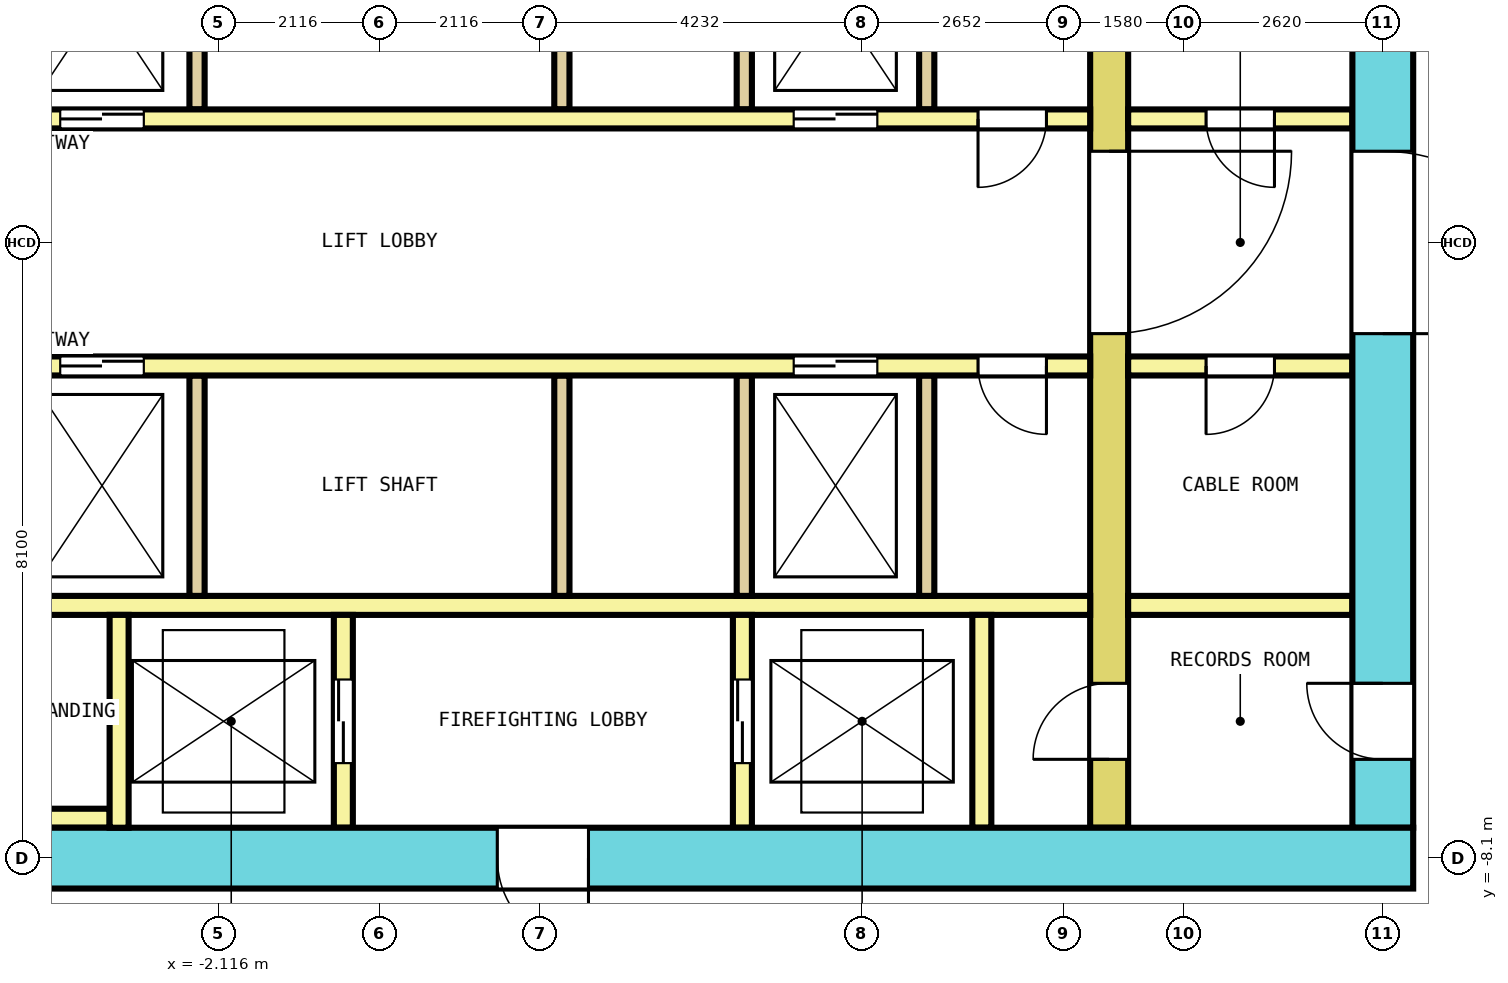
"""IFC4 building model, lengths in metres.
Left out: names, types, materials, properties, quantities, classifications, styles, units other than length and angle.
Written with IfcOpenShell. Run it as: python <this file> out.ifc"""

import sys

from ifc_helpers import new_model, si_unit, direction, frame, frame_2d, origin, place, context, subcontext, project, spatial, rectangle, extrude, element, fill, save


model = new_model("IFC4")
c1 = context("Model", 3, precision=1e-05, world=origin(), true_north=direction((0.0, 1.0)))
c2 = subcontext(c1, "Body", "Model", "MODEL_VIEW")
j1 = project(units=[si_unit("LENGTHUNIT", "METRE"), si_unit("PLANEANGLEUNIT", "RADIAN")], contexts=[c1])
p1 = place(None, origin())
s1 = spatial("IfcSite", under=j1, at=p1, CompositionType="ELEMENT")
p2 = place(p1, origin())
s2 = spatial("IfcBuilding", under=s1, at=p2, CompositionType="ELEMENT")
p3 = place(p2, frame((0.0, 0.0, 126.4)))
s3 = spatial("IfcBuildingStorey", under=s2, at=p3, CompositionType="ELEMENT", Elevation=126.4)
p4 = place(p3, frame((-13.6, -8.1, 0.0), z_axis=(0.0, 0.0, 1.0), x_axis=(1.0, 0.0, 0.0)))
e1 = element("IfcWall", 1, at=p4, inside=s3, PredefinedType="SHEAR", context=c2, shape_type="SweptSolid", body=[
    extrude(rectangle(XDim=27.2, YDim=0.8, at=frame_2d((13.6, 0.0))), origin(), (0.0, 0.0, 1.0), 4.1),
])
p5 = place(p4, frame((15.15, 0.0, 0.0)))
e2 = element("IfcOpeningElement", 2, at=p5, cuts=e1, PredefinedType="OPENING", context=c2, shape_type="SweptSolid", body=[
    extrude(rectangle(XDim=1.2, YDim=2.1, at=frame_2d((0.6, 1.05))), frame((0.0, 0.41, 0.0), z_axis=(0.0, -1.0, 0.0), x_axis=(1.0, 0.0, 0.0)), (0.0, 0.0, 1.0), 0.82),
])
p6 = place(p3, frame((13.2, -7.7, 0.0), z_axis=(0.0, 0.0, 1.0), x_axis=(0.0, 1.0, 0.0)))
e3 = element("IfcWall", 3, at=p6, inside=s3, PredefinedType="SHEAR", context=c2, shape_type="SweptSolid", body=[
    extrude(rectangle(XDim=15.4, YDim=0.8, at=frame_2d((7.7, 0.0))), origin(), (0.0, 0.0, 1.0), 4.1),
])
p7 = place(p6, frame((6.5, 0.0, 0.0)))
e4 = element("IfcOpeningElement", 4, at=p7, cuts=e3, PredefinedType="OPENING", context=c2, shape_type="SweptSolid", body=[
    extrude(rectangle(XDim=2.4, YDim=2.1, at=frame_2d((1.2, 1.05))), frame((0.0, 0.41, 0.0), z_axis=(0.0, -1.0, 0.0), x_axis=(1.0, 0.0, 0.0)), (0.0, 0.0, 1.0), 0.82),
])
p8 = place(p6, frame((13.4, 0.0, 0.0)))
e5 = element("IfcOpeningElement", 5, at=p8, cuts=e3, PredefinedType="OPENING", context=c2, shape_type="SweptSolid", body=[
    extrude(rectangle(XDim=1.2, YDim=2.1, at=frame_2d((0.6, 1.05))), frame((0.0, 0.41, 0.0), z_axis=(0.0, -1.0, 0.0), x_axis=(1.0, 0.0, 0.0)), (0.0, 0.0, 1.0), 0.82),
])
p9 = place(p6, frame((0.9, 0.0, 0.0)))
e6 = element("IfcOpeningElement", 6, at=p9, cuts=e3, PredefinedType="OPENING", context=c2, shape_type="SweptSolid", body=[
    extrude(rectangle(XDim=1.0, YDim=2.1, at=frame_2d((0.5, 1.05))), frame((0.0, 0.41, 0.0), z_axis=(0.0, -1.0, 0.0), x_axis=(1.0, 0.0, 0.0)), (0.0, 0.0, 1.0), 0.82),
])
p10 = place(p3, frame((9.6, -7.7, 0.0), z_axis=(0.0, 0.0, 1.0), x_axis=(0.0, 1.0, 0.0)))
e7 = element("IfcWall", 7, at=p10, inside=s3, PredefinedType="SHEAR", context=c2, shape_type="SweptSolid", body=[
    extrude(rectangle(XDim=15.4, YDim=0.5, at=frame_2d((7.7, 0.0))), origin(), (0.0, 0.0, 1.0), 4.1),
])
p11 = place(p10, frame((6.5, 0.0, 0.0)))
e8 = element("IfcOpeningElement", 8, at=p11, cuts=e7, PredefinedType="OPENING", context=c2, shape_type="SweptSolid", body=[
    extrude(rectangle(XDim=2.4, YDim=2.1, at=frame_2d((1.2, 1.05))), frame((0.0, 0.26, 0.0), z_axis=(0.0, -1.0, 0.0), x_axis=(1.0, 0.0, 0.0)), (0.0, 0.0, 1.0), 0.52),
])
p12 = place(p10, frame((13.4, 0.0, 0.0)))
e9 = element("IfcOpeningElement", 9, at=p12, cuts=e7, PredefinedType="OPENING", context=c2, shape_type="SweptSolid", body=[
    extrude(rectangle(XDim=1.2, YDim=2.1, at=frame_2d((0.6, 1.05))), frame((0.0, 0.26, 0.0), z_axis=(0.0, -1.0, 0.0), x_axis=(1.0, 0.0, 0.0)), (0.0, 0.0, 1.0), 0.52),
])
p13 = place(p10, frame((0.9, 0.0, 0.0)))
e10 = element("IfcOpeningElement", 10, at=p13, cuts=e7, PredefinedType="OPENING", context=c2, shape_type="SweptSolid", body=[
    extrude(rectangle(XDim=1.0, YDim=2.1, at=frame_2d((0.5, 1.05))), frame((0.0, 0.26, 0.0), z_axis=(0.0, -1.0, 0.0), x_axis=(1.0, 0.0, 0.0)), (0.0, 0.0, 1.0), 0.52),
])
p14 = place(p3, frame((-9.35, 1.625, 0.0), z_axis=(0.0, 0.0, 1.0), x_axis=(1.0, 0.0, 0.0)))
e11 = element("IfcWall", 11, at=p14, inside=s3, PredefinedType="SOLIDWALL", context=c2, shape_type="SweptSolid", body=[
    extrude(rectangle(XDim=18.7, YDim=0.25, at=frame_2d((9.35, 0.0))), origin(), (0.0, 0.0, 1.0), 4.1),
])
p15 = place(p14, frame((2.85, 0.0, 0.0)))
e12 = element("IfcOpeningElement", 12, at=p15, cuts=e11, PredefinedType="OPENING", context=c2, shape_type="SweptSolid", body=[
    extrude(rectangle(XDim=1.1, YDim=2.1, at=frame_2d((0.55, 1.05))), frame((0.0, 0.135, 0.0), z_axis=(0.0, -1.0, 0.0), x_axis=(1.0, 0.0, 0.0)), (0.0, 0.0, 1.0), 0.27),
])
p16 = place(p14, frame((5.15, 0.0, 0.0)))
e13 = element("IfcOpeningElement", 13, at=p16, cuts=e11, PredefinedType="OPENING", context=c2, shape_type="SweptSolid", body=[
    extrude(rectangle(XDim=1.1, YDim=2.1, at=frame_2d((0.55, 1.05))), frame((0.0, 0.135, 0.0), z_axis=(0.0, -1.0, 0.0), x_axis=(1.0, 0.0, 0.0)), (0.0, 0.0, 1.0), 0.27),
])
p17 = place(p14, frame((14.8, 0.0, 0.0)))
e14 = element("IfcOpeningElement", 14, at=p17, cuts=e11, PredefinedType="OPENING", context=c2, shape_type="SweptSolid", body=[
    extrude(rectangle(XDim=1.1, YDim=2.1, at=frame_2d((0.55, 1.05))), frame((0.0, 0.135, 0.0), z_axis=(0.0, -1.0, 0.0), x_axis=(1.0, 0.0, 0.0)), (0.0, 0.0, 1.0), 0.27),
])
p18 = place(p14, frame((0.575, 0.0, 0.0)))
e15 = element("IfcOpeningElement", 15, at=p18, cuts=e11, PredefinedType="OPENING", context=c2, shape_type="SweptSolid", body=[
    extrude(rectangle(XDim=0.9, YDim=2.1, at=frame_2d((0.45, 1.05))), frame((0.0, 0.135, 0.0), z_axis=(0.0, -1.0, 0.0), x_axis=(1.0, 0.0, 0.0)), (0.0, 0.0, 1.0), 0.27),
])
p19 = place(p14, frame((17.225, 0.0, 0.0)))
e16 = element("IfcOpeningElement", 16, at=p19, cuts=e11, PredefinedType="OPENING", context=c2, shape_type="SweptSolid", body=[
    extrude(rectangle(XDim=0.9, YDim=2.1, at=frame_2d((0.45, 1.05))), frame((0.0, 0.135, 0.0), z_axis=(0.0, -1.0, 0.0), x_axis=(1.0, 0.0, 0.0)), (0.0, 0.0, 1.0), 0.27),
])
p20 = place(p3, frame((9.85, 1.625, 0.0), z_axis=(0.0, 0.0, 1.0), x_axis=(1.0, 0.0, 0.0)))
e17 = element("IfcWall", 17, at=p20, inside=s3, PredefinedType="SOLIDWALL", context=c2, shape_type="SweptSolid", body=[
    extrude(rectangle(XDim=2.95, YDim=0.25, at=frame_2d((1.475, 0.0))), origin(), (0.0, 0.0, 1.0), 4.1),
])
p21 = place(p20, frame((1.025, 0.0, 0.0)))
e18 = element("IfcOpeningElement", 18, at=p21, cuts=e17, PredefinedType="OPENING", context=c2, shape_type="SweptSolid", body=[
    extrude(rectangle(XDim=0.9, YDim=2.1, at=frame_2d((0.45, 1.05))), frame((0.0, 0.135, 0.0), z_axis=(0.0, -1.0, 0.0), x_axis=(1.0, 0.0, 0.0)), (0.0, 0.0, 1.0), 0.27),
])
for number, where, z_axis, x_axis in (
    (19, (-2.4, 1.75, 0.0), (0.0, 0.0, 1.0), (0.0, 1.0, 0.0)),
    (20, (2.4, 1.75, 0.0), (0.0, 0.0, 1.0), (0.0, 1.0, 0.0)),
    (21, (4.8, 1.75, 0.0), (0.0, 0.0, 1.0), (0.0, 1.0, 0.0)),
    (22, (7.2, 1.75, 0.0), (0.0, 0.0, 1.0), (0.0, 1.0, 0.0)),
):
    element("IfcWall", number, at=place(p3, frame(where, z_axis=z_axis, x_axis=x_axis)), inside=s3, PredefinedType="SOLIDWALL", context=c2, shape_type="SweptSolid", body=[
        extrude(rectangle(XDim=2.9, YDim=0.2, at=frame_2d((1.45, 0.0))), origin(), (0.0, 0.0, 1.0), 4.1),
    ])
p22 = place(p3, frame((-9.35, -1.625, 0.0), z_axis=(0.0, 0.0, 1.0), x_axis=(1.0, 0.0, 0.0)))
e23 = element("IfcWall", 23, at=p22, inside=s3, PredefinedType="SOLIDWALL", context=c2, shape_type="SweptSolid", body=[
    extrude(rectangle(XDim=18.7, YDim=0.25, at=frame_2d((9.35, 0.0))), origin(), (0.0, 0.0, 1.0), 4.1),
])
p23 = place(p22, frame((2.85, 0.0, 0.0)))
e24 = element("IfcOpeningElement", 24, at=p23, cuts=e23, PredefinedType="OPENING", context=c2, shape_type="SweptSolid", body=[
    extrude(rectangle(XDim=1.1, YDim=2.1, at=frame_2d((0.55, 1.05))), frame((0.0, 0.135, 0.0), z_axis=(0.0, -1.0, 0.0), x_axis=(1.0, 0.0, 0.0)), (0.0, 0.0, 1.0), 0.27),
])
p24 = place(p22, frame((5.15, 0.0, 0.0)))
e25 = element("IfcOpeningElement", 25, at=p24, cuts=e23, PredefinedType="OPENING", context=c2, shape_type="SweptSolid", body=[
    extrude(rectangle(XDim=1.1, YDim=2.1, at=frame_2d((0.55, 1.05))), frame((0.0, 0.135, 0.0), z_axis=(0.0, -1.0, 0.0), x_axis=(1.0, 0.0, 0.0)), (0.0, 0.0, 1.0), 0.27),
])
p25 = place(p22, frame((14.8, 0.0, 0.0)))
e26 = element("IfcOpeningElement", 26, at=p25, cuts=e23, PredefinedType="OPENING", context=c2, shape_type="SweptSolid", body=[
    extrude(rectangle(XDim=1.1, YDim=2.1, at=frame_2d((0.55, 1.05))), frame((0.0, 0.135, 0.0), z_axis=(0.0, -1.0, 0.0), x_axis=(1.0, 0.0, 0.0)), (0.0, 0.0, 1.0), 0.27),
])
p26 = place(p22, frame((0.575, 0.0, 0.0)))
e27 = element("IfcOpeningElement", 27, at=p26, cuts=e23, PredefinedType="OPENING", context=c2, shape_type="SweptSolid", body=[
    extrude(rectangle(XDim=0.9, YDim=2.1, at=frame_2d((0.45, 1.05))), frame((0.0, 0.135, 0.0), z_axis=(0.0, -1.0, 0.0), x_axis=(1.0, 0.0, 0.0)), (0.0, 0.0, 1.0), 0.27),
])
p27 = place(p22, frame((17.225, 0.0, 0.0)))
e28 = element("IfcOpeningElement", 28, at=p27, cuts=e23, PredefinedType="OPENING", context=c2, shape_type="SweptSolid", body=[
    extrude(rectangle(XDim=0.9, YDim=2.1, at=frame_2d((0.45, 1.05))), frame((0.0, 0.135, 0.0), z_axis=(0.0, -1.0, 0.0), x_axis=(1.0, 0.0, 0.0)), (0.0, 0.0, 1.0), 0.27),
])
p28 = place(p3, frame((9.85, -1.625, 0.0), z_axis=(0.0, 0.0, 1.0), x_axis=(1.0, 0.0, 0.0)))
e29 = element("IfcWall", 29, at=p28, inside=s3, PredefinedType="SOLIDWALL", context=c2, shape_type="SweptSolid", body=[
    extrude(rectangle(XDim=2.95, YDim=0.25, at=frame_2d((1.475, 0.0))), origin(), (0.0, 0.0, 1.0), 4.1),
])
p29 = place(p28, frame((1.025, 0.0, 0.0)))
e30 = element("IfcOpeningElement", 30, at=p29, cuts=e29, PredefinedType="OPENING", context=c2, shape_type="SweptSolid", body=[
    extrude(rectangle(XDim=0.9, YDim=2.1, at=frame_2d((0.45, 1.05))), frame((0.0, 0.135, 0.0), z_axis=(0.0, -1.0, 0.0), x_axis=(1.0, 0.0, 0.0)), (0.0, 0.0, 1.0), 0.27),
])
p30 = place(p3, frame((-9.35, -4.775, 0.0), z_axis=(0.0, 0.0, 1.0), x_axis=(1.0, 0.0, 0.0)))
e31 = element("IfcWall", 31, at=p30, inside=s3, PredefinedType="SOLIDWALL", context=c2, shape_type="SweptSolid", body=[
    extrude(rectangle(XDim=18.7, YDim=0.25, at=frame_2d((9.35, 0.0))), origin(), (0.0, 0.0, 1.0), 4.1),
])
p31 = place(p3, frame((9.85, -4.775, 0.0), z_axis=(0.0, 0.0, 1.0), x_axis=(1.0, 0.0, 0.0)))
e32 = element("IfcWall", 32, at=p31, inside=s3, PredefinedType="SOLIDWALL", context=c2, shape_type="SweptSolid", body=[
    extrude(rectangle(XDim=2.95, YDim=0.25, at=frame_2d((1.475, 0.0))), origin(), (0.0, 0.0, 1.0), 4.1),
])
for number, where, z_axis, x_axis in (
    (33, (-2.4, -4.65, 0.0), (0.0, 0.0, 1.0), (0.0, 1.0, 0.0)),
    (34, (2.4, -4.65, 0.0), (0.0, 0.0, 1.0), (0.0, 1.0, 0.0)),
    (35, (4.8, -4.65, 0.0), (0.0, 0.0, 1.0), (0.0, 1.0, 0.0)),
    (36, (7.2, -4.65, 0.0), (0.0, 0.0, 1.0), (0.0, 1.0, 0.0)),
):
    element("IfcWall", number, at=place(p3, frame(where, z_axis=z_axis, x_axis=x_axis)), inside=s3, PredefinedType="SOLIDWALL", context=c2, shape_type="SweptSolid", body=[
        extrude(rectangle(XDim=2.9, YDim=0.2, at=frame_2d((1.45, 0.0))), origin(), (0.0, 0.0, 1.0), 4.1),
    ])
p32 = place(p3, frame((-9.35, -7.575, 0.0), z_axis=(0.0, 0.0, 1.0), x_axis=(1.0, 0.0, 0.0)))
e37 = element("IfcWall", 37, at=p32, inside=s3, PredefinedType="SOLIDWALL", context=c2, shape_type="SweptSolid", body=[
    extrude(rectangle(XDim=5.8, YDim=0.25, at=frame_2d((2.9, 0.0))), origin(), (0.0, 0.0, 1.0), 4.1),
])
p33 = place(p3, frame((-3.425, -7.7, 0.0), z_axis=(0.0, 0.0, 1.0), x_axis=(0.0, 1.0, 0.0)))
e38 = element("IfcWall", 38, at=p33, inside=s3, PredefinedType="SOLIDWALL", context=c2, shape_type="SweptSolid", body=[
    extrude(rectangle(XDim=2.8, YDim=0.25, at=frame_2d((1.4, 0.0))), origin(), (0.0, 0.0, 1.0), 4.1),
])
p34 = place(p3, frame((-0.475, -7.7, 0.0), z_axis=(0.0, 0.0, 1.0), x_axis=(0.0, 1.0, 0.0)))
e39 = element("IfcWall", 39, at=p34, inside=s3, PredefinedType="SOLIDWALL", context=c2, shape_type="SweptSolid", body=[
    extrude(rectangle(XDim=2.8, YDim=0.25, at=frame_2d((1.4, 0.0))), origin(), (0.0, 0.0, 1.0), 4.1),
])
p35 = place(p34, frame((0.85, 0.0, 0.0)))
e40 = element("IfcOpeningElement", 40, at=p35, cuts=e39, PredefinedType="OPENING", context=c2, shape_type="SweptSolid", body=[
    extrude(rectangle(XDim=1.1, YDim=2.1, at=frame_2d((0.55, 1.05))), frame((0.0, 0.135, 0.0), z_axis=(0.0, -1.0, 0.0), x_axis=(1.0, 0.0, 0.0)), (0.0, 0.0, 1.0), 0.27),
])
p36 = place(p3, frame((4.775, -7.7, 0.0), z_axis=(0.0, 0.0, 1.0), x_axis=(0.0, 1.0, 0.0)))
e41 = element("IfcWall", 41, at=p36, inside=s3, PredefinedType="SOLIDWALL", context=c2, shape_type="SweptSolid", body=[
    extrude(rectangle(XDim=2.8, YDim=0.25, at=frame_2d((1.4, 0.0))), origin(), (0.0, 0.0, 1.0), 4.1),
])
p37 = place(p36, frame((0.85, 0.0, 0.0)))
e42 = element("IfcOpeningElement", 42, at=p37, cuts=e41, PredefinedType="OPENING", context=c2, shape_type="SweptSolid", body=[
    extrude(rectangle(XDim=1.1, YDim=2.1, at=frame_2d((0.55, 1.05))), frame((0.0, 0.135, 0.0), z_axis=(0.0, -1.0, 0.0), x_axis=(1.0, 0.0, 0.0)), (0.0, 0.0, 1.0), 0.27),
])
p38 = place(p3, frame((7.925, -7.7, 0.0), z_axis=(0.0, 0.0, 1.0), x_axis=(0.0, 1.0, 0.0)))
e43 = element("IfcWall", 43, at=p38, inside=s3, PredefinedType="SOLIDWALL", context=c2, shape_type="SweptSolid", body=[
    extrude(rectangle(XDim=2.8, YDim=0.25, at=frame_2d((1.4, 0.0))), origin(), (0.0, 0.0, 1.0), 4.1),
])
p39 = place(p16, origin())
e44 = element("IfcDoor", 44, at=p39, inside=s3, OperationType="DOUBLE_DOOR_SLIDING", PredefinedType="DOOR", context=c2, shape_type="SweptSolid", body=[
    extrude(rectangle(XDim=1.1, YDim=2.1, at=frame_2d((0.55, 1.05))), frame((0.0, 0.075, 0.0), z_axis=(0.0, -1.0, 0.0), x_axis=(1.0, 0.0, 0.0)), (0.0, 0.0, 1.0), 0.15),
])
fill(e13, e44)
p40 = place(p17, origin())
e45 = element("IfcDoor", 45, at=p40, inside=s3, OperationType="DOUBLE_DOOR_SLIDING", PredefinedType="DOOR", context=c2, shape_type="SweptSolid", body=[
    extrude(rectangle(XDim=1.1, YDim=2.1, at=frame_2d((0.55, 1.05))), frame((0.0, 0.075, 0.0), z_axis=(0.0, -1.0, 0.0), x_axis=(1.0, 0.0, 0.0)), (0.0, 0.0, 1.0), 0.15),
])
fill(e14, e45)
p41 = place(p24, origin())
e46 = element("IfcDoor", 46, at=p41, inside=s3, OperationType="DOUBLE_DOOR_SLIDING", PredefinedType="DOOR", context=c2, shape_type="SweptSolid", body=[
    extrude(rectangle(XDim=1.1, YDim=2.1, at=frame_2d((0.55, 1.05))), frame((0.0, 0.075, 0.0), z_axis=(0.0, -1.0, 0.0), x_axis=(1.0, 0.0, 0.0)), (0.0, 0.0, 1.0), 0.15),
])
fill(e25, e46)
p42 = place(p25, origin())
e47 = element("IfcDoor", 47, at=p42, inside=s3, OperationType="DOUBLE_DOOR_SLIDING", PredefinedType="DOOR", context=c2, shape_type="SweptSolid", body=[
    extrude(rectangle(XDim=1.1, YDim=2.1, at=frame_2d((0.55, 1.05))), frame((0.0, 0.075, 0.0), z_axis=(0.0, -1.0, 0.0), x_axis=(1.0, 0.0, 0.0)), (0.0, 0.0, 1.0), 0.15),
])
fill(e26, e47)
p43 = place(p35, origin())
e48 = element("IfcDoor", 48, at=p43, inside=s3, OperationType="DOUBLE_DOOR_SLIDING", PredefinedType="DOOR", context=c2, shape_type="SweptSolid", body=[
    extrude(rectangle(XDim=1.1, YDim=2.1, at=frame_2d((0.55, 1.05))), frame((0.0, 0.075, 0.0), z_axis=(0.0, -1.0, 0.0), x_axis=(1.0, 0.0, 0.0)), (0.0, 0.0, 1.0), 0.15),
])
fill(e40, e48)
p44 = place(p37, origin())
e49 = element("IfcDoor", 49, at=p44, inside=s3, OperationType="DOUBLE_DOOR_SLIDING", PredefinedType="DOOR", context=c2, shape_type="SweptSolid", body=[
    extrude(rectangle(XDim=1.1, YDim=2.1, at=frame_2d((0.55, 1.05))), frame((0.0, 0.075, 0.0), z_axis=(0.0, -1.0, 0.0), x_axis=(1.0, 0.0, 0.0)), (0.0, 0.0, 1.0), 0.15),
])
fill(e42, e49)
p45 = place(p11, origin())
e50 = element("IfcDoor", 50, at=p45, inside=s3, OperationType="DOUBLE_DOOR_SINGLE_SWING", PredefinedType="DOOR", context=c2, shape_type="SweptSolid", body=[
    extrude(rectangle(XDim=2.4, YDim=2.1, at=frame_2d((1.2, 1.05))), frame((0.0, 0.2, 0.0), z_axis=(0.0, -1.0, 0.0), x_axis=(1.0, 0.0, 0.0)), (0.0, 0.0, 1.0), 0.4),
])
fill(e8, e50)
p46 = place(p7, origin())
e51 = element("IfcDoor", 51, at=p46, inside=s3, OperationType="DOUBLE_DOOR_SINGLE_SWING", PredefinedType="DOOR", context=c2, shape_type="SweptSolid", body=[
    extrude(rectangle(XDim=2.4, YDim=2.1, at=frame_2d((1.2, 1.05))), frame((0.0, 0.3, 0.0), z_axis=(0.0, -1.0, 0.0), x_axis=(1.0, 0.0, 0.0)), (0.0, 0.0, 1.0), 0.6),
])
fill(e4, e51)
p47 = place(p5, origin())
e52 = element("IfcDoor", 52, at=p47, inside=s3, OperationType="SINGLE_SWING_RIGHT", PredefinedType="DOOR", context=c2, shape_type="SweptSolid", body=[
    extrude(rectangle(XDim=1.2, YDim=2.1, at=frame_2d((0.6, 1.05))), frame((0.0, 0.3, 0.0), z_axis=(0.0, -1.0, 0.0), x_axis=(1.0, 0.0, 0.0)), (0.0, 0.0, 1.0), 0.6),
])
fill(e2, e52)
p48 = place(p13, origin())
e53 = element("IfcDoor", 53, at=p48, inside=s3, OperationType="SINGLE_SWING_RIGHT", PredefinedType="DOOR", context=c2, shape_type="SweptSolid", body=[
    extrude(rectangle(XDim=1.0, YDim=2.1, at=frame_2d((0.5, 1.05))), frame((0.0, 0.2, 0.0), z_axis=(0.0, -1.0, 0.0), x_axis=(1.0, 0.0, 0.0)), (0.0, 0.0, 1.0), 0.4),
])
fill(e10, e53)
p49 = place(p9, origin())
e54 = element("IfcDoor", 54, at=p49, inside=s3, OperationType="SINGLE_SWING_LEFT", PredefinedType="DOOR", context=c2, shape_type="SweptSolid", body=[
    extrude(rectangle(XDim=1.0, YDim=2.1, at=frame_2d((0.5, 1.05))), frame((0.0, 0.3, 0.0), z_axis=(0.0, -1.0, 0.0), x_axis=(1.0, 0.0, 0.0)), (0.0, 0.0, 1.0), 0.6),
])
fill(e6, e54)
p50 = place(p19, origin())
e55 = element("IfcDoor", 55, at=p50, inside=s3, OperationType="SINGLE_SWING_RIGHT", PredefinedType="DOOR", context=c2, shape_type="SweptSolid", body=[
    extrude(rectangle(XDim=0.9, YDim=2.1, at=frame_2d((0.45, 1.05))), frame((0.0, 0.075, 0.0), z_axis=(0.0, -1.0, 0.0), x_axis=(1.0, 0.0, 0.0)), (0.0, 0.0, 1.0), 0.15),
])
fill(e16, e55)
p51 = place(p21, origin())
e56 = element("IfcDoor", 56, at=p51, inside=s3, OperationType="SINGLE_SWING_LEFT", PredefinedType="DOOR", context=c2, shape_type="SweptSolid", body=[
    extrude(rectangle(XDim=0.9, YDim=2.1, at=frame_2d((0.45, 1.05))), frame((0.0, 0.075, 0.0), z_axis=(0.0, -1.0, 0.0), x_axis=(1.0, 0.0, 0.0)), (0.0, 0.0, 1.0), 0.15),
])
fill(e18, e56)
p52 = place(p27, origin())
e57 = element("IfcDoor", 57, at=p52, inside=s3, OperationType="SINGLE_SWING_RIGHT", PredefinedType="DOOR", context=c2, shape_type="SweptSolid", body=[
    extrude(rectangle(XDim=0.9, YDim=2.1, at=frame_2d((0.45, 1.05))), frame((0.0, 0.075, 0.0), z_axis=(0.0, -1.0, 0.0), x_axis=(1.0, 0.0, 0.0)), (0.0, 0.0, 1.0), 0.15),
])
fill(e28, e57)
p53 = place(p29, origin())
e58 = element("IfcDoor", 58, at=p53, inside=s3, OperationType="SINGLE_SWING_LEFT", PredefinedType="DOOR", context=c2, shape_type="SweptSolid", body=[
    extrude(rectangle(XDim=0.9, YDim=2.1, at=frame_2d((0.45, 1.05))), frame((0.0, 0.075, 0.0), z_axis=(0.0, -1.0, 0.0), x_axis=(1.0, 0.0, 0.0)), (0.0, 0.0, 1.0), 0.15),
])
fill(e30, e58)
save(model, sys.argv[1])
